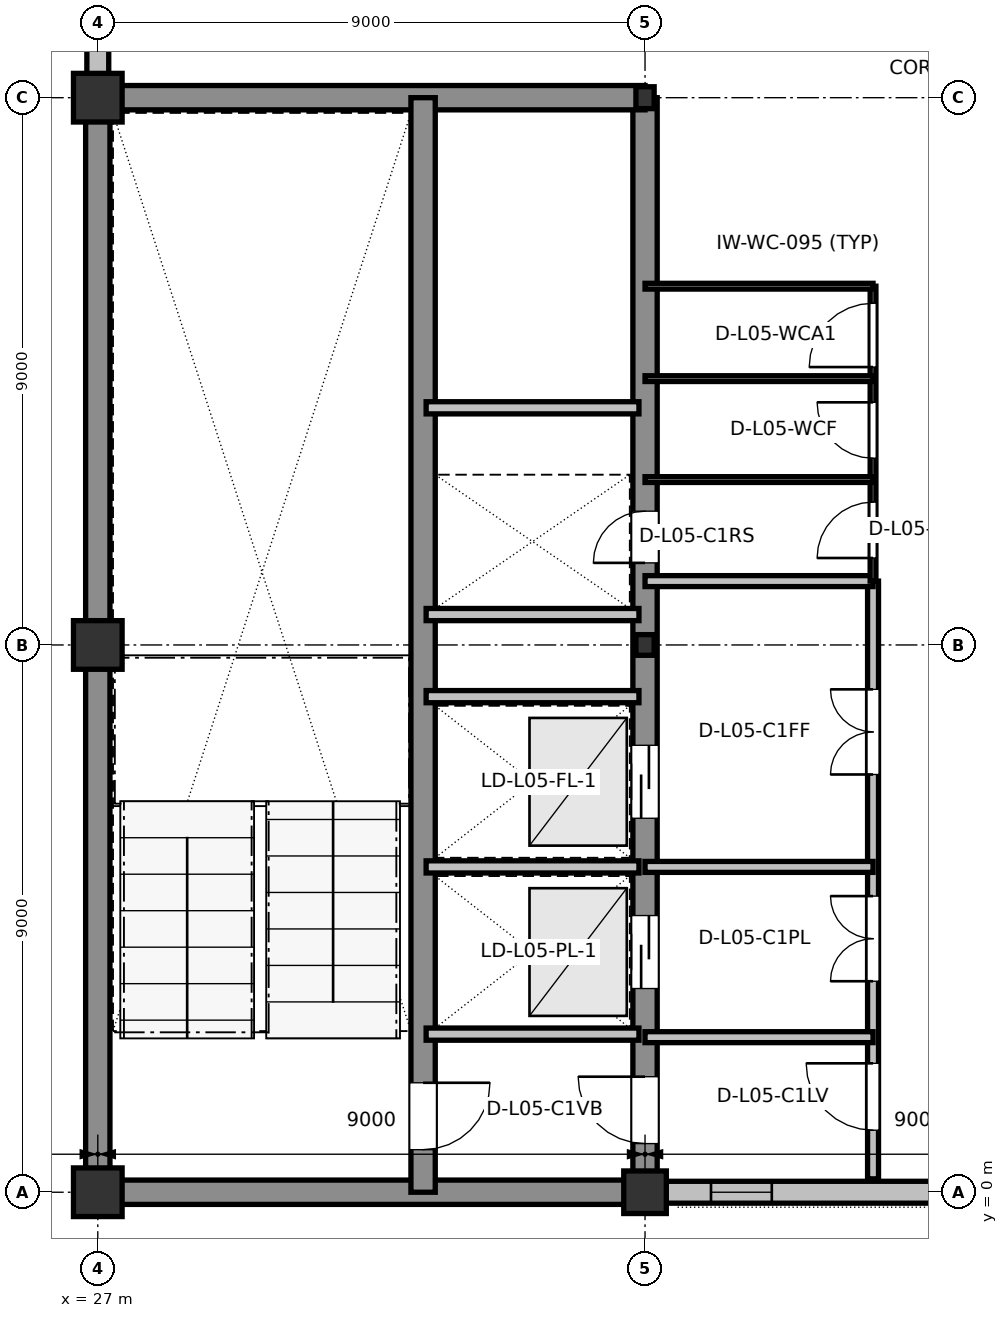
"""IFC4 building model, lengths in metres.
Left out: names, types, materials, properties, quantities, classifications, styles, units other than length and angle.
Written with IfcOpenShell. Run it as: python <this file> out.ifc"""

import sys

from ifc_helpers import new_model, si_unit, direction, frame, frame_2d, origin, origin_2d, place, context, subcontext, project, spatial, rectangle, i_section, extrude, element, fill, save


model = new_model("IFC4")
c1 = context("Model", 3, precision=1e-05, world=origin(), true_north=direction((0.0, 1.0)))
c2 = subcontext(c1, "Body", "Model", "MODEL_VIEW")
j1 = project(units=[si_unit("LENGTHUNIT", "METRE"), si_unit("PLANEANGLEUNIT", "RADIAN")], contexts=[c1])
p1 = place(None, origin())
s1 = spatial("IfcSite", under=j1, at=p1, CompositionType="ELEMENT")
p2 = place(p1, origin())
s2 = spatial("IfcBuilding", under=s1, at=p2, CompositionType="ELEMENT")
p3 = place(p2, frame((0.0, 0.0, 23.4)))
s3 = spatial("IfcBuildingStorey", under=s2, at=p3, CompositionType="ELEMENT", Elevation=23.4)
for number, where, z_axis, x_axis in (
    (1, (27.0, 0.0, 0.0), (0.0, 0.0, 1.0), (1.0, 0.0, 0.0)),
    (2, (27.0, 9.0, 0.0), (0.0, 0.0, 1.0), (1.0, 0.0, 0.0)),
    (3, (27.0, 18.0, 0.0), (0.0, 0.0, 1.0), (1.0, 0.0, 0.0)),
):
    element("IfcColumn", number, at=place(p3, frame(where, z_axis=z_axis, x_axis=x_axis)), inside=s3, PredefinedType="COLUMN", context=c2, shape_type="SweptSolid", body=[
        extrude(rectangle(XDim=0.8, YDim=0.8, at=origin_2d()), origin(), (0.0, 0.0, 1.0), 4.2),
    ])
p4 = place(p3, frame((36.0, 0.0, 0.0), z_axis=(0.0, 0.0, 1.0), x_axis=(1.0, 0.0, 0.0)))
e4 = element("IfcColumn", 4, at=p4, inside=s3, PredefinedType="COLUMN", context=c2, shape_type="SweptSolid", body=[
    extrude(rectangle(XDim=0.7, YDim=0.7, at=origin_2d()), origin(), (0.0, 0.0, 1.0), 4.2),
])
p5 = place(p3, frame((36.0, 9.0, 0.0), z_axis=(0.0, 0.0, 1.0), x_axis=(1.0, 0.0, 0.0)))
e5 = element("IfcColumn", 5, at=p5, inside=s3, PredefinedType="COLUMN", context=c2, shape_type="SweptSolid", body=[
    extrude(i_section(OverallWidth=0.3, OverallDepth=0.34, WebThickness=0.012, FlangeThickness=0.021, at=origin_2d()), origin(), (0.0, 0.0, 1.0), 4.2),
])
p6 = place(p3, frame((36.0, 18.0, 0.0), z_axis=(0.0, 0.0, 1.0), x_axis=(1.0, 0.0, 0.0)))
e6 = element("IfcColumn", 6, at=p6, inside=s3, PredefinedType="COLUMN", context=c2, shape_type="SweptSolid", body=[
    extrude(i_section(OverallWidth=0.3, OverallDepth=0.36, WebThickness=0.012, FlangeThickness=0.022, at=origin_2d()), origin(), (0.0, 0.0, 1.0), 4.2),
])
p7 = place(p3, frame((27.0, 21.075, 0.0), z_axis=(0.0, 0.0, 1.0), x_axis=(0.0, -1.0, 0.0)))
e7 = element("IfcWall", 7, at=p7, inside=s3, PredefinedType="STANDARD", context=c2, shape_type="SweptSolid", body=[
    extrude(rectangle(XDim=2.69, YDim=0.36, at=frame_2d((1.345, 0.0))), origin(), (0.0, 0.0, 1.0), 3.715),
])
p8 = place(p3, frame((36.335, 0.0, 0.0), z_axis=(0.0, 0.0, 1.0), x_axis=(1.0, 0.0, 0.0)))
e8 = element("IfcWall", 8, at=p8, inside=s3, PredefinedType="STANDARD", context=c2, shape_type="SweptSolid", body=[
    extrude(rectangle(XDim=8.33, YDim=0.36, at=frame_2d((4.165, 0.0))), origin(), (0.0, 0.0, 1.0), 3.715),
])
p9 = place(p8, frame((0.75, 0.0, 0.9)))
e9 = element("IfcOpeningElement", 9, at=p9, cuts=e8, PredefinedType="OPENING", context=c2, shape_type="SweptSolid", body=[
    extrude(rectangle(XDim=1.0, YDim=1.7, at=frame_2d((0.5, 0.85))), frame((0.0, 0.19, 0.0), z_axis=(0.0, -1.0, 0.0), x_axis=(1.0, 0.0, 0.0)), (0.0, 0.0, 1.0), 0.38),
])
p10 = place(p3, frame((27.0, 0.0, 0.0), z_axis=(0.0, 0.0, 1.0), x_axis=(1.0, 0.0, 0.0)))
e10 = element("IfcWall", 10, at=p10, inside=s3, PredefinedType="SHEAR", context=c2, shape_type="SweptSolid", body=[
    extrude(rectangle(XDim=9.0, YDim=0.4, at=frame_2d((4.5, 0.0))), origin(), (0.0, 0.0, 1.0), 3.96),
])
p11 = place(p3, frame((36.0, 0.0, 0.0), z_axis=(0.0, 0.0, 1.0), x_axis=(0.0, 1.0, 0.0)))
e11 = element("IfcWall", 11, at=p11, inside=s3, PredefinedType="SHEAR", context=c2, shape_type="SweptSolid", body=[
    extrude(rectangle(XDim=18.0, YDim=0.4, at=frame_2d((9.0, 0.0))), origin(), (0.0, 0.0, 1.0), 3.96),
])
p12 = place(p11, frame((0.8, 0.0, 0.0)))
e12 = element("IfcOpeningElement", 12, at=p12, cuts=e11, PredefinedType="OPENING", context=c2, shape_type="SweptSolid", body=[
    extrude(rectangle(XDim=1.1, YDim=2.16, at=frame_2d((0.55, 1.08))), frame((0.0, 0.21, 0.0), z_axis=(0.0, -1.0, 0.0), x_axis=(1.0, 0.0, 0.0)), (0.0, 0.0, 1.0), 0.42),
])
p13 = place(p11, frame((3.35, 0.0, 0.0)))
e13 = element("IfcOpeningElement", 13, at=p13, cuts=e11, PredefinedType="OPENING", context=c2, shape_type="SweptSolid", body=[
    extrude(rectangle(XDim=1.2, YDim=2.2, at=frame_2d((0.6, 1.1))), frame((0.0, 0.21, 0.0), z_axis=(0.0, -1.0, 0.0), x_axis=(1.0, 0.0, 0.0)), (0.0, 0.0, 1.0), 0.42),
])
p14 = place(p11, frame((6.15, 0.0, 0.0)))
e14 = element("IfcOpeningElement", 14, at=p14, cuts=e11, PredefinedType="OPENING", context=c2, shape_type="SweptSolid", body=[
    extrude(rectangle(XDim=1.2, YDim=2.2, at=frame_2d((0.6, 1.1))), frame((0.0, 0.21, 0.0), z_axis=(0.0, -1.0, 0.0), x_axis=(1.0, 0.0, 0.0)), (0.0, 0.0, 1.0), 0.42),
])
p15 = place(p11, frame((10.35, 0.0, 0.0)))
e15 = element("IfcOpeningElement", 15, at=p15, cuts=e11, PredefinedType="OPENING", context=c2, shape_type="SweptSolid", body=[
    extrude(rectangle(XDim=0.85, YDim=2.1, at=frame_2d((0.425, 1.05))), frame((0.0, 0.21, 0.0), z_axis=(0.0, -1.0, 0.0), x_axis=(1.0, 0.0, 0.0)), (0.0, 0.0, 1.0), 0.42),
])
p16 = place(p3, frame((36.0, 18.0, 0.0), z_axis=(0.0, 0.0, 1.0), x_axis=(-1.0, 0.0, 0.0)))
e16 = element("IfcWall", 16, at=p16, inside=s3, PredefinedType="SHEAR", context=c2, shape_type="SweptSolid", body=[
    extrude(rectangle(XDim=9.0, YDim=0.4, at=frame_2d((4.5, 0.0))), origin(), (0.0, 0.0, 1.0), 3.96),
])
p17 = place(p3, frame((27.0, 18.0, 0.0), z_axis=(0.0, 0.0, 1.0), x_axis=(0.0, -1.0, 0.0)))
e17 = element("IfcWall", 17, at=p17, inside=s3, PredefinedType="SHEAR", context=c2, shape_type="SweptSolid", body=[
    extrude(rectangle(XDim=18.0, YDim=0.4, at=frame_2d((9.0, 0.0))), origin(), (0.0, 0.0, 1.0), 3.96),
])
p18 = place(p3, frame((32.35, 0.0, 0.0), z_axis=(0.0, 0.0, 1.0), x_axis=(0.0, 1.0, 0.0)))
e18 = element("IfcWall", 18, at=p18, inside=s3, PredefinedType="SHEAR", context=c2, shape_type="SweptSolid", body=[
    extrude(rectangle(XDim=18.0, YDim=0.4, at=frame_2d((9.0, 0.0))), origin(), (0.0, 0.0, 1.0), 3.96),
])
p19 = place(p18, frame((0.7, 0.0, 0.0)))
e19 = element("IfcOpeningElement", 19, at=p19, cuts=e18, PredefinedType="OPENING", context=c2, shape_type="SweptSolid", body=[
    extrude(rectangle(XDim=1.1, YDim=2.16, at=frame_2d((0.55, 1.08))), frame((0.0, 0.21, 0.0), z_axis=(0.0, -1.0, 0.0), x_axis=(1.0, 0.0, 0.0)), (0.0, 0.0, 1.0), 0.42),
])
for number, where, z_axis, x_axis in (
    (20, (32.4, 2.6, 0.0), (0.0, 0.0, 1.0), (1.0, 0.0, 0.0)),
    (21, (32.4, 5.35, 0.0), (0.0, 0.0, 1.0), (1.0, 0.0, 0.0)),
    (22, (32.4, 8.15, 0.0), (0.0, 0.0, 1.0), (1.0, 0.0, 0.0)),
    (23, (32.4, 9.5, 0.0), (0.0, 0.0, 1.0), (1.0, 0.0, 0.0)),
    (24, (32.4, 12.9, 0.0), (0.0, 0.0, 1.0), (1.0, 0.0, 0.0)),
):
    element("IfcWall", number, at=place(p3, frame(where, z_axis=z_axis, x_axis=x_axis)), inside=s3, PredefinedType="PARTITIONING", context=c2, shape_type="SweptSolid", body=[
        extrude(rectangle(XDim=3.5, YDim=0.2, at=frame_2d((1.75, 0.0))), origin(), (0.0, 0.0, 1.0), 3.96),
    ])
p20 = place(p3, frame((39.75, 0.22, 0.0), z_axis=(0.0, 0.0, 1.0), x_axis=(0.0, 1.0, 0.0)))
e25 = element("IfcWall", 25, at=p20, inside=s3, PredefinedType="PARTITIONING", context=c2, shape_type="SweptSolid", body=[
    extrude(rectangle(XDim=9.83, YDim=0.18, at=frame_2d((4.915, 0.0))), origin(), (0.0, 0.0, 1.0), 3.96),
])
p21 = place(p20, frame((0.8, 0.0, 0.0)))
e26 = element("IfcOpeningElement", 26, at=p21, cuts=e25, PredefinedType="OPENING", context=c2, shape_type="SweptSolid", body=[
    extrude(rectangle(XDim=1.1, YDim=2.16, at=frame_2d((0.55, 1.08))), frame((0.0, 0.1, 0.0), z_axis=(0.0, -1.0, 0.0), x_axis=(1.0, 0.0, 0.0)), (0.0, 0.0, 1.0), 0.2),
])
p22 = place(p20, frame((3.25, 0.0, 0.0)))
e27 = element("IfcOpeningElement", 27, at=p22, cuts=e25, PredefinedType="OPENING", context=c2, shape_type="SweptSolid", body=[
    extrude(rectangle(XDim=1.4, YDim=2.2, at=frame_2d((0.7, 1.1))), frame((0.0, 0.1, 0.0), z_axis=(0.0, -1.0, 0.0), x_axis=(1.0, 0.0, 0.0)), (0.0, 0.0, 1.0), 0.2),
])
p23 = place(p20, frame((6.65, 0.0, 0.0)))
e28 = element("IfcOpeningElement", 28, at=p23, cuts=e25, PredefinedType="OPENING", context=c2, shape_type="SweptSolid", body=[
    extrude(rectangle(XDim=1.4, YDim=2.2, at=frame_2d((0.7, 1.1))), frame((0.0, 0.1, 0.0), z_axis=(0.0, -1.0, 0.0), x_axis=(1.0, 0.0, 0.0)), (0.0, 0.0, 1.0), 0.2),
])
for number, where, z_axis, x_axis in (
    (29, (36.0, 2.55, 0.0), (0.0, 0.0, 1.0), (1.0, 0.0, 0.0)),
    (30, (36.0, 5.35, 0.0), (0.0, 0.0, 1.0), (1.0, 0.0, 0.0)),
    (31, (36.0, 10.05, 0.0), (0.0, 0.0, 1.0), (1.0, 0.0, 0.0)),
):
    element("IfcWall", number, at=place(p3, frame(where, z_axis=z_axis, x_axis=x_axis)), inside=s3, PredefinedType="PARTITIONING", context=c2, shape_type="SweptSolid", body=[
        extrude(rectangle(XDim=3.75, YDim=0.18, at=frame_2d((1.875, 0.0))), origin(), (0.0, 0.0, 1.0), 3.96),
    ])
p24 = place(p3, frame((39.75, 10.05, 0.0), z_axis=(0.0, 0.0, 1.0), x_axis=(0.0, 1.0, 0.0)))
e32 = element("IfcWall", 32, at=p24, inside=s3, PredefinedType="PARTITIONING", context=c2, shape_type="SweptSolid", body=[
    extrude(rectangle(XDim=4.85, YDim=0.095, at=frame_2d((2.425, 0.0))), origin(), (0.0, 0.0, 1.0), 3.96),
])
p25 = place(p24, frame((0.38, 0.0, 0.0)))
e33 = element("IfcOpeningElement", 33, at=p25, cuts=e32, PredefinedType="OPENING", context=c2, shape_type="SweptSolid", body=[
    extrude(rectangle(XDim=0.92, YDim=2.1, at=frame_2d((0.46, 1.05))), frame((0.0, 0.057, 0.0), z_axis=(0.0, -1.0, 0.0), x_axis=(1.0, 0.0, 0.0)), (0.0, 0.0, 1.0), 0.115),
])
p26 = place(p24, frame((2.02, 0.0, 0.0)))
e34 = element("IfcOpeningElement", 34, at=p26, cuts=e32, PredefinedType="OPENING", context=c2, shape_type="SweptSolid", body=[
    extrude(rectangle(XDim=0.92, YDim=2.1, at=frame_2d((0.46, 1.05))), frame((0.0, 0.057, 0.0), z_axis=(0.0, -1.0, 0.0), x_axis=(1.0, 0.0, 0.0)), (0.0, 0.0, 1.0), 0.115),
])
p27 = place(p24, frame((3.52, 0.0, 0.0)))
e35 = element("IfcOpeningElement", 35, at=p27, cuts=e32, PredefinedType="OPENING", context=c2, shape_type="SweptSolid", body=[
    extrude(rectangle(XDim=1.05, YDim=2.13, at=frame_2d((0.525, 1.065))), frame((0.0, 0.057, 0.0), z_axis=(0.0, -1.0, 0.0), x_axis=(1.0, 0.0, 0.0)), (0.0, 0.0, 1.0), 0.115),
])
for number, where, z_axis, x_axis in (
    (36, (36.0, 11.72, 0.0), (0.0, 0.0, 1.0), (1.0, 0.0, 0.0)),
    (37, (36.0, 13.38, 0.0), (0.0, 0.0, 1.0), (1.0, 0.0, 0.0)),
):
    element("IfcWall", number, at=place(p3, frame(where, z_axis=z_axis, x_axis=x_axis)), inside=s3, PredefinedType="PARTITIONING", context=c2, shape_type="SweptSolid", body=[
        extrude(rectangle(XDim=3.75, YDim=0.095, at=frame_2d((1.875, 0.0))), origin(), (0.0, 0.0, 1.0), 3.96),
    ])
p28 = place(p3, frame((36.0, 14.9, 0.0), z_axis=(0.0, 0.0, 1.0), x_axis=(1.0, 0.0, 0.0)))
e38 = element("IfcWall", 38, at=p28, inside=s3, PredefinedType="PARTITIONING", context=c2, shape_type="SweptSolid", body=[
    extrude(rectangle(XDim=3.75, YDim=0.095, at=frame_2d((1.875, 0.0))), origin(), (0.0, 0.0, 1.0), 3.705),
])
p29 = place(p9, origin())
e39 = element("IfcWindow", 39, at=p29, inside=s3, PartitioningType="SINGLE_PANEL", PredefinedType="WINDOW", context=c2, shape_type="SweptSolid", body=[
    extrude(rectangle(XDim=1.0, YDim=1.7, at=frame_2d((0.5, 0.85))), frame((0.0, 0.03, 0.0), z_axis=(0.0, -1.0, 0.0), x_axis=(1.0, 0.0, 0.0)), (0.0, 0.0, 1.0), 0.06),
])
fill(e9, e39)
p30 = place(p19, frame((1.1, 0.0, 0.0), z_axis=(0.0, 0.0, 1.0), x_axis=(-1.0, 0.0, 0.0)))
e40 = element("IfcDoor", 40, at=p30, inside=s3, OperationType="SINGLE_SWING_LEFT", PredefinedType="DOOR", context=c2, shape_type="SweptSolid", body=[
    extrude(rectangle(XDim=1.1, YDim=2.16, at=frame_2d((0.55, 1.08))), frame((0.0, 0.025, 0.0), z_axis=(0.0, -1.0, 0.0), x_axis=(1.0, 0.0, 0.0)), (0.0, 0.0, 1.0), 0.05),
])
fill(e19, e40)
p31 = place(p12, origin())
e41 = element("IfcDoor", 41, at=p31, inside=s3, OperationType="SINGLE_SWING_RIGHT", PredefinedType="DOOR", context=c2, shape_type="SweptSolid", body=[
    extrude(rectangle(XDim=1.1, YDim=2.16, at=frame_2d((0.55, 1.08))), frame((0.0, 0.025, 0.0), z_axis=(0.0, -1.0, 0.0), x_axis=(1.0, 0.0, 0.0)), (0.0, 0.0, 1.0), 0.05),
])
fill(e12, e41)
p32 = place(p13, origin())
e42 = element("IfcDoor", 42, at=p32, inside=s3, OperationType="SLIDING_TO_LEFT", PredefinedType="DOOR", context=c2, shape_type="SweptSolid", body=[
    extrude(rectangle(XDim=1.2, YDim=2.2, at=frame_2d((0.6, 1.1))), frame((0.0, 0.025, 0.0), z_axis=(0.0, -1.0, 0.0), x_axis=(1.0, 0.0, 0.0)), (0.0, 0.0, 1.0), 0.05),
])
fill(e13, e42)
p33 = place(p14, origin())
e43 = element("IfcDoor", 43, at=p33, inside=s3, OperationType="SLIDING_TO_LEFT", PredefinedType="DOOR", context=c2, shape_type="SweptSolid", body=[
    extrude(rectangle(XDim=1.2, YDim=2.2, at=frame_2d((0.6, 1.1))), frame((0.0, 0.025, 0.0), z_axis=(0.0, -1.0, 0.0), x_axis=(1.0, 0.0, 0.0)), (0.0, 0.0, 1.0), 0.05),
])
fill(e14, e43)
p34 = place(p15, origin())
e44 = element("IfcDoor", 44, at=p34, inside=s3, OperationType="SINGLE_SWING_LEFT", PredefinedType="DOOR", context=c2, shape_type="SweptSolid", body=[
    extrude(rectangle(XDim=0.85, YDim=2.1, at=frame_2d((0.425, 1.05))), frame((0.0, 0.025, 0.0), z_axis=(0.0, -1.0, 0.0), x_axis=(1.0, 0.0, 0.0)), (0.0, 0.0, 1.0), 0.05),
])
fill(e15, e44)
p35 = place(p21, origin())
e45 = element("IfcDoor", 45, at=p35, inside=s3, OperationType="SINGLE_SWING_RIGHT", PredefinedType="DOOR", context=c2, shape_type="SweptSolid", body=[
    extrude(rectangle(XDim=1.1, YDim=2.16, at=frame_2d((0.55, 1.08))), frame((0.0, 0.025, 0.0), z_axis=(0.0, -1.0, 0.0), x_axis=(1.0, 0.0, 0.0)), (0.0, 0.0, 1.0), 0.05),
])
fill(e26, e45)
p36 = place(p22, origin())
e46 = element("IfcDoor", 46, at=p36, inside=s3, OperationType="DOUBLE_DOOR_SINGLE_SWING", PredefinedType="DOOR", context=c2, shape_type="SweptSolid", body=[
    extrude(rectangle(XDim=1.4, YDim=2.2, at=frame_2d((0.7, 1.1))), frame((0.0, 0.025, 0.0), z_axis=(0.0, -1.0, 0.0), x_axis=(1.0, 0.0, 0.0)), (0.0, 0.0, 1.0), 0.05),
])
fill(e27, e46)
p37 = place(p23, origin())
e47 = element("IfcDoor", 47, at=p37, inside=s3, OperationType="DOUBLE_DOOR_SINGLE_SWING", PredefinedType="DOOR", context=c2, shape_type="SweptSolid", body=[
    extrude(rectangle(XDim=1.4, YDim=2.2, at=frame_2d((0.7, 1.1))), frame((0.0, 0.025, 0.0), z_axis=(0.0, -1.0, 0.0), x_axis=(1.0, 0.0, 0.0)), (0.0, 0.0, 1.0), 0.05),
])
fill(e28, e47)
p38 = place(p25, origin())
e48 = element("IfcDoor", 48, at=p38, inside=s3, OperationType="SINGLE_SWING_LEFT", PredefinedType="DOOR", context=c2, shape_type="SweptSolid", body=[
    extrude(rectangle(XDim=0.92, YDim=2.1, at=frame_2d((0.46, 1.05))), frame((0.0, 0.025, 0.0), z_axis=(0.0, -1.0, 0.0), x_axis=(1.0, 0.0, 0.0)), (0.0, 0.0, 1.0), 0.05),
])
fill(e33, e48)
p39 = place(p26, origin())
e49 = element("IfcDoor", 49, at=p39, inside=s3, OperationType="SINGLE_SWING_RIGHT", PredefinedType="DOOR", context=c2, shape_type="SweptSolid", body=[
    extrude(rectangle(XDim=0.92, YDim=2.1, at=frame_2d((0.46, 1.05))), frame((0.0, 0.025, 0.0), z_axis=(0.0, -1.0, 0.0), x_axis=(1.0, 0.0, 0.0)), (0.0, 0.0, 1.0), 0.05),
])
fill(e34, e49)
p40 = place(p27, origin())
e50 = element("IfcDoor", 50, at=p40, inside=s3, OperationType="SINGLE_SWING_LEFT", PredefinedType="DOOR", context=c2, shape_type="SweptSolid", body=[
    extrude(rectangle(XDim=1.05, YDim=2.13, at=frame_2d((0.525, 1.065))), frame((0.0, 0.025, 0.0), z_axis=(0.0, -1.0, 0.0), x_axis=(1.0, 0.0, 0.0)), (0.0, 0.0, 1.0), 0.05),
])
fill(e35, e50)
save(model, sys.argv[1])
